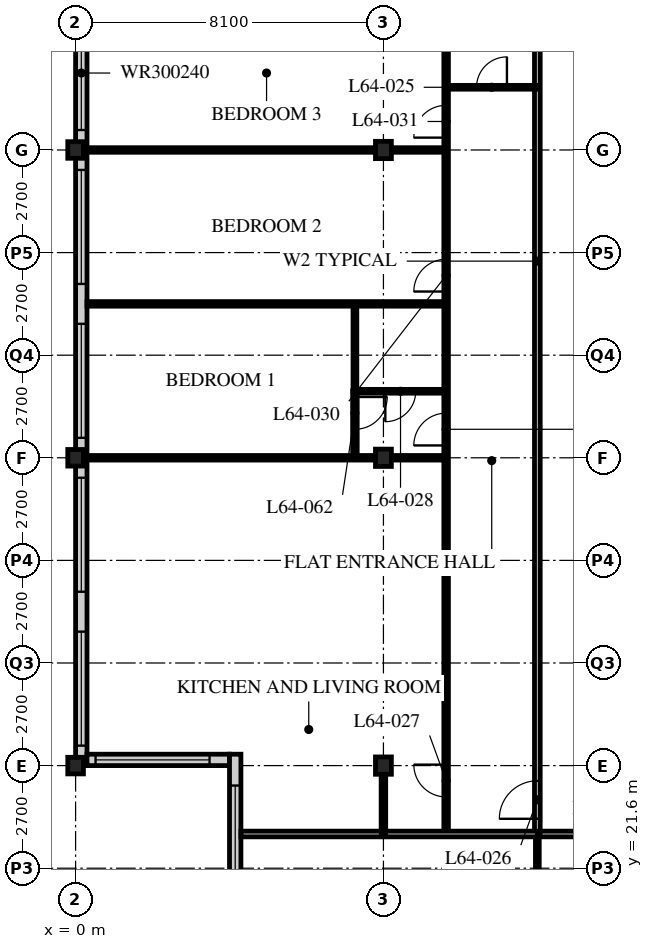
"""IFC4 building model, lengths in metres.
Left out: names, types, materials, properties, quantities, classifications, styles, units other than length and angle.
Written with IfcOpenShell. Run it as: python <this file> out.ifc"""

import sys

from ifc_helpers import new_model, si_unit, direction, frame, frame_2d, origin, origin_2d, place, context, subcontext, project, spatial, rectangle, i_section, extrude, element, fill, save


model = new_model("IFC4")
c1 = context("Model", 3, precision=1e-05, world=origin(), true_north=direction((0.0, 1.0)))
c2 = subcontext(c1, "Body", "Model", "MODEL_VIEW")
j1 = project(units=[si_unit("LENGTHUNIT", "METRE"), si_unit("PLANEANGLEUNIT", "RADIAN")], contexts=[c1])
p1 = place(None, origin())
s1 = spatial("IfcSite", under=j1, at=p1, CompositionType="ELEMENT")
p2 = place(p1, origin())
s2 = spatial("IfcBuilding", under=s1, at=p2, CompositionType="ELEMENT")
p3 = place(p2, frame((0.0, 0.0, 250.2)))
s3 = spatial("IfcBuildingStorey", under=s2, at=p3, CompositionType="ELEMENT", Elevation=250.2)
for number, where, z_axis, x_axis in (
    (1, (0.0, 24.3, 0.0), (0.0, 0.0, 1.0), (1.0, 0.0, 0.0)),
    (2, (0.0, 32.4, 0.0), (0.0, 0.0, 1.0), (1.0, 0.0, 0.0)),
    (3, (0.0, 40.5, 0.0), (0.0, 0.0, 1.0), (1.0, 0.0, 0.0)),
):
    element("IfcColumn", number, at=place(p3, frame(where, z_axis=z_axis, x_axis=x_axis)), inside=s3, PredefinedType="COLUMN", context=c2, shape_type="SweptSolid", body=[
        extrude(i_section(OverallWidth=0.412, OverallDepth=0.437, WebThickness=0.036, FlangeThickness=0.058, FilletRadius=0.015, at=origin_2d()), origin(), (0.0, 0.0, 1.0), 3.9),
    ])
for number, where, z_axis, x_axis in (
    (4, (8.1, 24.3, 0.0), (0.0, 0.0, 1.0), (1.0, 0.0, 0.0)),
    (5, (8.1, 32.4, 0.0), (0.0, 0.0, 1.0), (1.0, 0.0, 0.0)),
    (6, (8.1, 40.5, 0.0), (0.0, 0.0, 1.0), (1.0, 0.0, 0.0)),
):
    element("IfcColumn", number, at=place(p3, frame(where, z_axis=z_axis, x_axis=x_axis)), inside=s3, PredefinedType="COLUMN", context=c2, shape_type="SweptSolid", body=[
        extrude(i_section(OverallWidth=0.418, OverallDepth=0.456, WebThickness=0.042, FlangeThickness=0.067, FilletRadius=0.015, at=origin_2d()), origin(), (0.0, 0.0, 1.0), 3.9),
    ])
p4 = place(p3, frame((0.15, 56.4, 0.0), z_axis=(0.0, 0.0, 1.0), x_axis=(0.0, -1.0, 0.0)))
e7 = element("IfcWall", 7, at=p4, inside=s3, PredefinedType="SOLIDWALL", context=c2, shape_type="SweptSolid", body=[
    extrude(rectangle(XDim=32.1, YDim=0.3, at=frame_2d((16.05, 0.0))), origin(), (0.0, 0.0, 1.0), 3.69),
])
p5 = place(p4, frame((0.225, 0.0, 0.6)))
e8 = element("IfcOpeningElement", 8, at=p5, cuts=e7, PredefinedType="OPENING", context=c2, shape_type="SweptSolid", body=[
    extrude(rectangle(XDim=3.0, YDim=2.4, at=frame_2d((1.5, 1.2))), frame((0.0, 0.16, 0.0), z_axis=(0.0, -1.0, 0.0), x_axis=(1.0, 0.0, 0.0)), (0.0, 0.0, 1.0), 0.32),
])
p6 = place(p4, frame((4.275, 0.0, 0.6)))
e9 = element("IfcOpeningElement", 9, at=p6, cuts=e7, PredefinedType="OPENING", context=c2, shape_type="SweptSolid", body=[
    extrude(rectangle(XDim=3.0, YDim=2.4, at=frame_2d((1.5, 1.2))), frame((0.0, 0.16, 0.0), z_axis=(0.0, -1.0, 0.0), x_axis=(1.0, 0.0, 0.0)), (0.0, 0.0, 1.0), 0.32),
])
p7 = place(p4, frame((8.325, 0.0, 0.6)))
e10 = element("IfcOpeningElement", 10, at=p7, cuts=e7, PredefinedType="OPENING", context=c2, shape_type="SweptSolid", body=[
    extrude(rectangle(XDim=3.0, YDim=2.4, at=frame_2d((1.5, 1.2))), frame((0.0, 0.16, 0.0), z_axis=(0.0, -1.0, 0.0), x_axis=(1.0, 0.0, 0.0)), (0.0, 0.0, 1.0), 0.32),
])
p8 = place(p4, frame((12.375, 0.0, 0.6)))
e11 = element("IfcOpeningElement", 11, at=p8, cuts=e7, PredefinedType="OPENING", context=c2, shape_type="SweptSolid", body=[
    extrude(rectangle(XDim=3.0, YDim=2.4, at=frame_2d((1.5, 1.2))), frame((0.0, 0.16, 0.0), z_axis=(0.0, -1.0, 0.0), x_axis=(1.0, 0.0, 0.0)), (0.0, 0.0, 1.0), 0.32),
])
p9 = place(p4, frame((16.425, 0.0, 0.6)))
e12 = element("IfcOpeningElement", 12, at=p9, cuts=e7, PredefinedType="OPENING", context=c2, shape_type="SweptSolid", body=[
    extrude(rectangle(XDim=3.0, YDim=2.4, at=frame_2d((1.5, 1.2))), frame((0.0, 0.16, 0.0), z_axis=(0.0, -1.0, 0.0), x_axis=(1.0, 0.0, 0.0)), (0.0, 0.0, 1.0), 0.32),
])
p10 = place(p4, frame((20.475, 0.0, 0.6)))
e13 = element("IfcOpeningElement", 13, at=p10, cuts=e7, PredefinedType="OPENING", context=c2, shape_type="SweptSolid", body=[
    extrude(rectangle(XDim=3.0, YDim=2.4, at=frame_2d((1.5, 1.2))), frame((0.0, 0.16, 0.0), z_axis=(0.0, -1.0, 0.0), x_axis=(1.0, 0.0, 0.0)), (0.0, 0.0, 1.0), 0.32),
])
p11 = place(p4, frame((24.525, 0.0, 0.6)))
e14 = element("IfcOpeningElement", 14, at=p11, cuts=e7, PredefinedType="OPENING", context=c2, shape_type="SweptSolid", body=[
    extrude(rectangle(XDim=3.0, YDim=2.4, at=frame_2d((1.5, 1.2))), frame((0.0, 0.16, 0.0), z_axis=(0.0, -1.0, 0.0), x_axis=(1.0, 0.0, 0.0)), (0.0, 0.0, 1.0), 0.32),
])
p12 = place(p4, frame((28.575, 0.0, 0.6)))
e15 = element("IfcOpeningElement", 15, at=p12, cuts=e7, PredefinedType="OPENING", context=c2, shape_type="SweptSolid", body=[
    extrude(rectangle(XDim=3.0, YDim=2.4, at=frame_2d((1.5, 1.2))), frame((0.0, 0.16, 0.0), z_axis=(0.0, -1.0, 0.0), x_axis=(1.0, 0.0, 0.0)), (0.0, 0.0, 1.0), 0.32),
])
p13 = place(p3, frame((0.3, 24.45, 0.0), z_axis=(0.0, 0.0, 1.0), x_axis=(1.0, 0.0, 0.0)))
e16 = element("IfcWall", 16, at=p13, inside=s3, PredefinedType="SOLIDWALL", context=c2, shape_type="SweptSolid", body=[
    extrude(rectangle(XDim=3.75, YDim=0.3, at=frame_2d((1.875, 0.0))), origin(), (0.0, 0.0, 1.0), 3.69),
])
p14 = place(p13, frame((0.225, 0.0, 0.6)))
e17 = element("IfcOpeningElement", 17, at=p14, cuts=e16, PredefinedType="OPENING", context=c2, shape_type="SweptSolid", body=[
    extrude(rectangle(XDim=3.0, YDim=2.3, at=frame_2d((1.5, 1.15))), frame((0.0, 0.16, 0.0), z_axis=(0.0, -1.0, 0.0), x_axis=(1.0, 0.0, 0.0)), (0.0, 0.0, 1.0), 0.32),
])
p15 = place(p3, frame((4.2, 24.6, 0.0), z_axis=(0.0, 0.0, 1.0), x_axis=(0.0, -1.0, 0.0)))
e18 = element("IfcWall", 18, at=p15, inside=s3, PredefinedType="SOLIDWALL", context=c2, shape_type="SweptSolid", body=[
    extrude(rectangle(XDim=4.35, YDim=0.3, at=frame_2d((2.175, 0.0))), origin(), (0.0, 0.0, 1.0), 3.69),
])
p16 = place(p15, frame((0.825, 0.0, 0.6)))
e19 = element("IfcOpeningElement", 19, at=p16, cuts=e18, PredefinedType="OPENING", context=c2, shape_type="SweptSolid", body=[
    extrude(rectangle(XDim=3.0, YDim=2.3, at=frame_2d((1.5, 1.15))), frame((0.0, 0.16, 0.0), z_axis=(0.0, -1.0, 0.0), x_axis=(1.0, 0.0, 0.0)), (0.0, 0.0, 1.0), 0.32),
])
p17 = place(p3, frame((12.15, 22.5, 0.0), z_axis=(0.0, 0.0, 1.0), x_axis=(1.0, 0.0, 0.0)))
e20 = element("IfcWall", 20, at=p17, inside=s3, PredefinedType="PARTITIONING", context=c2, shape_type="SweptSolid", body=[
    extrude(rectangle(XDim=24.3, YDim=0.15, at=frame_2d((12.15, 0.0))), origin(), (0.0, 0.0, 1.0), 3.69),
])
p18 = place(p17, frame((6.4, 0.0, 0.0)))
e21 = element("IfcOpeningElement", 21, at=p18, cuts=e20, PredefinedType="OPENING", context=c2, shape_type="SweptSolid", body=[
    extrude(rectangle(XDim=1.0, YDim=2.1, at=frame_2d((0.5, 1.05))), frame((0.0, 0.085, 0.0), z_axis=(0.0, -1.0, 0.0), x_axis=(1.0, 0.0, 0.0)), (0.0, 0.0, 1.0), 0.17),
])
p19 = place(p17, frame((8.5, 0.0, 0.0)))
e22 = element("IfcOpeningElement", 22, at=p19, cuts=e20, PredefinedType="OPENING", context=c2, shape_type="SweptSolid", body=[
    extrude(rectangle(XDim=1.0, YDim=2.1, at=frame_2d((0.5, 1.05))), frame((0.0, 0.085, 0.0), z_axis=(0.0, -1.0, 0.0), x_axis=(1.0, 0.0, 0.0)), (0.0, 0.0, 1.0), 0.17),
])
p20 = place(p17, frame((16.6, 0.0, 0.0)))
e23 = element("IfcOpeningElement", 23, at=p20, cuts=e20, PredefinedType="OPENING", context=c2, shape_type="SweptSolid", body=[
    extrude(rectangle(XDim=1.0, YDim=2.1, at=frame_2d((0.5, 1.05))), frame((0.0, 0.085, 0.0), z_axis=(0.0, -1.0, 0.0), x_axis=(1.0, 0.0, 0.0)), (0.0, 0.0, 1.0), 0.17),
])
p21 = place(p17, frame((2.625, 0.0, 0.0)))
e24 = element("IfcOpeningElement", 24, at=p21, cuts=e20, PredefinedType="OPENING", context=c2, shape_type="SweptSolid", body=[
    extrude(rectangle(XDim=1.0, YDim=2.1, at=frame_2d((0.5, 1.05))), frame((0.0, 0.085, 0.0), z_axis=(0.0, -1.0, 0.0), x_axis=(1.0, 0.0, 0.0)), (0.0, 0.0, 1.0), 0.17),
])
p22 = place(p3, frame((12.15, 22.5, 0.0), z_axis=(0.0, 0.0, 1.0), x_axis=(0.0, 1.0, 0.0)))
e25 = element("IfcWall", 25, at=p22, inside=s3, PredefinedType="PARTITIONING", context=c2, shape_type="SweptSolid", body=[
    extrude(rectangle(XDim=30.15, YDim=0.15, at=frame_2d((15.075, 0.0))), origin(), (0.0, 0.0, 1.0), 3.69),
])
p23 = place(p22, frame((0.4, 0.0, 0.0)))
e26 = element("IfcOpeningElement", 26, at=p23, cuts=e25, PredefinedType="OPENING", context=c2, shape_type="SweptSolid", body=[
    extrude(rectangle(XDim=1.0, YDim=2.1, at=frame_2d((0.5, 1.05))), frame((0.0, 0.085, 0.0), z_axis=(0.0, -1.0, 0.0), x_axis=(1.0, 0.0, 0.0)), (0.0, 0.0, 1.0), 0.17),
])
p24 = place(p22, frame((24.4, 0.0, 0.0)))
e27 = element("IfcOpeningElement", 27, at=p24, cuts=e25, PredefinedType="OPENING", context=c2, shape_type="SweptSolid", body=[
    extrude(rectangle(XDim=1.0, YDim=2.1, at=frame_2d((0.5, 1.05))), frame((0.0, 0.085, 0.0), z_axis=(0.0, -1.0, 0.0), x_axis=(1.0, 0.0, 0.0)), (0.0, 0.0, 1.0), 0.17),
])
p25 = place(p22, frame((28.45, 0.0, 0.0)))
e28 = element("IfcOpeningElement", 28, at=p25, cuts=e25, PredefinedType="OPENING", context=c2, shape_type="SweptSolid", body=[
    extrude(rectangle(XDim=1.0, YDim=2.1, at=frame_2d((0.5, 1.05))), frame((0.0, 0.085, 0.0), z_axis=(0.0, -1.0, 0.0), x_axis=(1.0, 0.0, 0.0)), (0.0, 0.0, 1.0), 0.17),
])
p26 = place(p3, frame((9.75, 22.5, 0.0), z_axis=(0.0, 0.0, 1.0), x_axis=(0.0, 1.0, 0.0)))
e29 = element("IfcWall", 29, at=p26, inside=s3, PredefinedType="PARTITIONING", context=c2, shape_type="SweptSolid", body=[
    extrude(rectangle(XDim=22.05, YDim=0.12, at=frame_2d((11.025, 0.0))), origin(), (0.0, 0.0, 1.0), 3.69),
])
p27 = place(p26, frame((0.975, 0.0, 0.0)))
e30 = element("IfcOpeningElement", 30, at=p27, cuts=e29, PredefinedType="OPENING", context=c2, shape_type="SweptSolid", body=[
    extrude(rectangle(XDim=0.85, YDim=2.1, at=frame_2d((0.425, 1.05))), frame((0.0, 0.07, 0.0), z_axis=(0.0, -1.0, 0.0), x_axis=(1.0, 0.0, 0.0)), (0.0, 0.0, 1.0), 0.14),
])
p28 = place(p26, frame((10.225, 0.0, 0.0)))
e31 = element("IfcOpeningElement", 31, at=p28, cuts=e29, PredefinedType="OPENING", context=c2, shape_type="SweptSolid", body=[
    extrude(rectangle(XDim=0.85, YDim=2.1, at=frame_2d((0.425, 1.05))), frame((0.0, 0.07, 0.0), z_axis=(0.0, -1.0, 0.0), x_axis=(1.0, 0.0, 0.0)), (0.0, 0.0, 1.0), 0.14),
])
p29 = place(p26, frame((14.275, 0.0, 0.0)))
e32 = element("IfcOpeningElement", 32, at=p29, cuts=e29, PredefinedType="OPENING", context=c2, shape_type="SweptSolid", body=[
    extrude(rectangle(XDim=0.85, YDim=2.1, at=frame_2d((0.425, 1.05))), frame((0.0, 0.07, 0.0), z_axis=(0.0, -1.0, 0.0), x_axis=(1.0, 0.0, 0.0)), (0.0, 0.0, 1.0), 0.14),
])
p30 = place(p26, frame((18.325, 0.0, 0.0)))
e33 = element("IfcOpeningElement", 33, at=p30, cuts=e29, PredefinedType="OPENING", context=c2, shape_type="SweptSolid", body=[
    extrude(rectangle(XDim=0.85, YDim=2.1, at=frame_2d((0.425, 1.05))), frame((0.0, 0.07, 0.0), z_axis=(0.0, -1.0, 0.0), x_axis=(1.0, 0.0, 0.0)), (0.0, 0.0, 1.0), 0.14),
])
p31 = place(p3, frame((12.15, 42.15, 0.0), z_axis=(0.0, 0.0, 1.0), x_axis=(-1.0, 0.0, 0.0)))
e34 = element("IfcWall", 34, at=p31, inside=s3, PredefinedType="PARTITIONING", context=c2, shape_type="SweptSolid", body=[
    extrude(rectangle(XDim=2.4, YDim=0.1, at=frame_2d((1.2, 0.0))), origin(), (0.0, 0.0, 1.0), 3.69),
])
p32 = place(p31, frame((0.8, 0.0, 0.0)))
e35 = element("IfcOpeningElement", 35, at=p32, cuts=e34, PredefinedType="OPENING", context=c2, shape_type="SweptSolid", body=[
    extrude(rectangle(XDim=0.8, YDim=2.1, at=frame_2d((0.4, 1.05))), frame((0.0, 0.06, 0.0), z_axis=(0.0, -1.0, 0.0), x_axis=(1.0, 0.0, 0.0)), (0.0, 0.0, 1.0), 0.12),
])
p33 = place(p3, frame((9.75, 34.15, 0.0), z_axis=(0.0, 0.0, 1.0), x_axis=(-1.0, 0.0, 0.0)))
e36 = element("IfcWall", 36, at=p33, inside=s3, PredefinedType="PARTITIONING", context=c2, shape_type="SweptSolid", body=[
    extrude(rectangle(XDim=2.4, YDim=0.1, at=frame_2d((1.2, 0.0))), origin(), (0.0, 0.0, 1.0), 3.69),
])
p34 = place(p33, frame((0.8, 0.0, 0.0)))
e37 = element("IfcOpeningElement", 37, at=p34, cuts=e36, PredefinedType="OPENING", context=c2, shape_type="SweptSolid", body=[
    extrude(rectangle(XDim=0.8, YDim=2.1, at=frame_2d((0.4, 1.05))), frame((0.0, 0.06, 0.0), z_axis=(0.0, -1.0, 0.0), x_axis=(1.0, 0.0, 0.0)), (0.0, 0.0, 1.0), 0.12),
])
p35 = place(p3, frame((7.35, 34.15, 0.0), z_axis=(0.0, 0.0, 1.0), x_axis=(0.0, 1.0, 0.0)))
e38 = element("IfcWall", 38, at=p35, inside=s3, PredefinedType="PARTITIONING", context=c2, shape_type="SweptSolid", body=[
    extrude(rectangle(XDim=2.3, YDim=0.1, at=frame_2d((1.15, 0.0))), origin(), (0.0, 0.0, 1.0), 3.69),
])
p36 = place(p3, frame((9.75, 32.4, 0.0), z_axis=(0.0, 0.0, 1.0), x_axis=(-1.0, 0.0, 0.0)))
e39 = element("IfcWall", 39, at=p36, inside=s3, PredefinedType="PARTITIONING", context=c2, shape_type="SweptSolid", body=[
    extrude(rectangle(XDim=9.45, YDim=0.12, at=frame_2d((4.725, 0.0))), origin(), (0.0, 0.0, 1.0), 3.078),
])
p37 = place(p3, frame((9.75, 36.45, 0.0), z_axis=(0.0, 0.0, 1.0), x_axis=(-1.0, 0.0, 0.0)))
e40 = element("IfcWall", 40, at=p37, inside=s3, PredefinedType="PARTITIONING", context=c2, shape_type="SweptSolid", body=[
    extrude(rectangle(XDim=9.45, YDim=0.12, at=frame_2d((4.725, 0.0))), origin(), (0.0, 0.0, 1.0), 3.69),
])
p38 = place(p3, frame((9.75, 40.5, 0.0), z_axis=(0.0, 0.0, 1.0), x_axis=(-1.0, 0.0, 0.0)))
e41 = element("IfcWall", 41, at=p38, inside=s3, PredefinedType="PARTITIONING", context=c2, shape_type="SweptSolid", body=[
    extrude(rectangle(XDim=9.45, YDim=0.12, at=frame_2d((4.725, 0.0))), origin(), (0.0, 0.0, 1.0), 3.078),
])
p39 = place(p3, frame((12.15, 22.5, 0.0), z_axis=(0.0, 0.0, 1.0), x_axis=(0.0, -1.0, 0.0)))
e42 = element("IfcWall", 42, at=p39, inside=s3, PredefinedType="PARTITIONING", context=c2, shape_type="SweptSolid", body=[
    extrude(rectangle(XDim=2.4, YDim=0.1, at=frame_2d((1.2, 0.0))), origin(), (0.0, 0.0, 1.0), 3.69),
])
p40 = place(p3, frame((4.35, 22.5, 0.0), z_axis=(0.0, 0.0, 1.0), x_axis=(1.0, 0.0, 0.0)))
e43 = element("IfcWall", 43, at=p40, inside=s3, PredefinedType="PARTITIONING", context=c2, shape_type="SweptSolid", body=[
    extrude(rectangle(XDim=7.8, YDim=0.15, at=frame_2d((3.9, 0.0))), origin(), (0.0, 0.0, 1.0), 3.69),
])
p41 = place(p3, frame((7.35, 32.4, 0.0), z_axis=(0.0, 0.0, 1.0), x_axis=(0.0, 1.0, 0.0)))
e44 = element("IfcWall", 44, at=p41, inside=s3, PredefinedType="PARTITIONING", context=c2, shape_type="SweptSolid", body=[
    extrude(rectangle(XDim=1.76, YDim=0.12, at=frame_2d((0.88, 0.0))), origin(), (0.0, 0.0, 1.0), 3.69),
])
p42 = place(p41, frame((0.75, 0.0, 0.0)))
e45 = element("IfcOpeningElement", 45, at=p42, cuts=e44, PredefinedType="OPENING", context=c2, shape_type="SweptSolid", body=[
    extrude(rectangle(XDim=0.85, YDim=2.1, at=frame_2d((0.425, 1.05))), frame((0.0, 0.07, 0.0), z_axis=(0.0, -1.0, 0.0), x_axis=(1.0, 0.0, 0.0)), (0.0, 0.0, 1.0), 0.14),
])
p43 = place(p3, frame((8.1, 22.5, 0.0), z_axis=(0.0, 0.0, 1.0), x_axis=(0.0, 1.0, 0.0)))
e46 = element("IfcWall", 46, at=p43, inside=s3, PredefinedType="PARTITIONING", context=c2, shape_type="SweptSolid", body=[
    extrude(rectangle(XDim=1.597, YDim=0.12, at=frame_2d((0.798, 0.0))), origin(), (0.0, 0.0, 1.0), 3.078),
])
p44 = place(p8, origin())
e47 = element("IfcWindow", 47, at=p44, inside=s3, PartitioningType="SINGLE_PANEL", PredefinedType="WINDOW", context=c2, shape_type="SweptSolid", body=[
    extrude(rectangle(XDim=3.0, YDim=2.4, at=frame_2d((1.5, 1.2))), frame((0.0, 0.03, 0.0), z_axis=(0.0, -1.0, 0.0), x_axis=(1.0, 0.0, 0.0)), (0.0, 0.0, 1.0), 0.06),
])
fill(e11, e47)
p45 = place(p9, origin())
e48 = element("IfcWindow", 48, at=p45, inside=s3, PartitioningType="SINGLE_PANEL", PredefinedType="WINDOW", context=c2, shape_type="SweptSolid", body=[
    extrude(rectangle(XDim=3.0, YDim=2.4, at=frame_2d((1.5, 1.2))), frame((0.0, 0.03, 0.0), z_axis=(0.0, -1.0, 0.0), x_axis=(1.0, 0.0, 0.0)), (0.0, 0.0, 1.0), 0.06),
])
fill(e12, e48)
p46 = place(p10, origin())
e49 = element("IfcWindow", 49, at=p46, inside=s3, PartitioningType="SINGLE_PANEL", PredefinedType="WINDOW", context=c2, shape_type="SweptSolid", body=[
    extrude(rectangle(XDim=3.0, YDim=2.4, at=frame_2d((1.5, 1.2))), frame((0.0, 0.03, 0.0), z_axis=(0.0, -1.0, 0.0), x_axis=(1.0, 0.0, 0.0)), (0.0, 0.0, 1.0), 0.06),
])
fill(e13, e49)
p47 = place(p11, origin())
e50 = element("IfcWindow", 50, at=p47, inside=s3, PartitioningType="SINGLE_PANEL", PredefinedType="WINDOW", context=c2, shape_type="SweptSolid", body=[
    extrude(rectangle(XDim=3.0, YDim=2.4, at=frame_2d((1.5, 1.2))), frame((0.0, 0.03, 0.0), z_axis=(0.0, -1.0, 0.0), x_axis=(1.0, 0.0, 0.0)), (0.0, 0.0, 1.0), 0.06),
])
fill(e14, e50)
p48 = place(p12, origin())
e51 = element("IfcWindow", 51, at=p48, inside=s3, PartitioningType="SINGLE_PANEL", PredefinedType="WINDOW", context=c2, shape_type="SweptSolid", body=[
    extrude(rectangle(XDim=3.0, YDim=2.4, at=frame_2d((1.5, 1.2))), frame((0.0, 0.03, 0.0), z_axis=(0.0, -1.0, 0.0), x_axis=(1.0, 0.0, 0.0)), (0.0, 0.0, 1.0), 0.06),
])
fill(e15, e51)
p49 = place(p14, origin())
e52 = element("IfcWindow", 52, at=p49, inside=s3, PartitioningType="SINGLE_PANEL", PredefinedType="WINDOW", context=c2, shape_type="SweptSolid", body=[
    extrude(rectangle(XDim=3.0, YDim=2.3, at=frame_2d((1.5, 1.15))), frame((0.0, 0.03, 0.0), z_axis=(0.0, -1.0, 0.0), x_axis=(1.0, 0.0, 0.0)), (0.0, 0.0, 1.0), 0.06),
])
fill(e17, e52)
p50 = place(p16, origin())
e53 = element("IfcWindow", 53, at=p50, inside=s3, PartitioningType="SINGLE_PANEL", PredefinedType="WINDOW", context=c2, shape_type="SweptSolid", body=[
    extrude(rectangle(XDim=3.0, YDim=2.3, at=frame_2d((1.5, 1.15))), frame((0.0, 0.03, 0.0), z_axis=(0.0, -1.0, 0.0), x_axis=(1.0, 0.0, 0.0)), (0.0, 0.0, 1.0), 0.06),
])
fill(e19, e53)
p51 = place(p32, origin())
e54 = element("IfcDoor", 54, at=p51, inside=s3, OperationType="SINGLE_SWING_RIGHT", PredefinedType="DOOR", context=c2, shape_type="SweptSolid", body=[
    extrude(rectangle(XDim=0.8, YDim=2.1, at=frame_2d((0.4, 1.05))), frame((0.0, 0.025, 0.0), z_axis=(0.0, -1.0, 0.0), x_axis=(1.0, 0.0, 0.0)), (0.0, 0.0, 1.0), 0.05),
])
fill(e35, e54)
p52 = place(p23, origin())
e55 = element("IfcDoor", 55, at=p52, inside=s3, OperationType="SINGLE_SWING_LEFT", PredefinedType="DOOR", context=c2, shape_type="SweptSolid", body=[
    extrude(rectangle(XDim=1.0, YDim=2.1, at=frame_2d((0.5, 1.05))), frame((0.0, 0.025, 0.0), z_axis=(0.0, -1.0, 0.0), x_axis=(1.0, 0.0, 0.0)), (0.0, 0.0, 1.0), 0.05),
])
fill(e26, e55)
p53 = place(p27, origin())
e56 = element("IfcDoor", 56, at=p53, inside=s3, OperationType="SINGLE_SWING_RIGHT", PredefinedType="DOOR", context=c2, shape_type="SweptSolid", body=[
    extrude(rectangle(XDim=0.85, YDim=2.1, at=frame_2d((0.425, 1.05))), frame((0.0, 0.025, 0.0), z_axis=(0.0, -1.0, 0.0), x_axis=(1.0, 0.0, 0.0)), (0.0, 0.0, 1.0), 0.05),
])
fill(e30, e56)
p54 = place(p34, origin())
e57 = element("IfcDoor", 57, at=p54, inside=s3, OperationType="SINGLE_SWING_RIGHT", PredefinedType="DOOR", context=c2, shape_type="SweptSolid", body=[
    extrude(rectangle(XDim=0.8, YDim=2.1, at=frame_2d((0.4, 1.05))), frame((0.0, 0.025, 0.0), z_axis=(0.0, -1.0, 0.0), x_axis=(1.0, 0.0, 0.0)), (0.0, 0.0, 1.0), 0.05),
])
fill(e37, e57)
p55 = place(p28, origin())
e58 = element("IfcDoor", 58, at=p55, inside=s3, OperationType="SINGLE_SWING_LEFT", PredefinedType="DOOR", context=c2, shape_type="SweptSolid", body=[
    extrude(rectangle(XDim=0.85, YDim=2.1, at=frame_2d((0.425, 1.05))), frame((0.0, 0.025, 0.0), z_axis=(0.0, -1.0, 0.0), x_axis=(1.0, 0.0, 0.0)), (0.0, 0.0, 1.0), 0.05),
])
fill(e31, e58)
p56 = place(p29, origin())
e59 = element("IfcDoor", 59, at=p56, inside=s3, OperationType="SINGLE_SWING_LEFT", PredefinedType="DOOR", context=c2, shape_type="SweptSolid", body=[
    extrude(rectangle(XDim=0.85, YDim=2.1, at=frame_2d((0.425, 1.05))), frame((0.0, 0.025, 0.0), z_axis=(0.0, -1.0, 0.0), x_axis=(1.0, 0.0, 0.0)), (0.0, 0.0, 1.0), 0.05),
])
fill(e32, e59)
p57 = place(p30, origin())
e60 = element("IfcDoor", 60, at=p57, inside=s3, OperationType="SINGLE_SWING_LEFT", PredefinedType="DOOR", context=c2, shape_type="SweptSolid", body=[
    extrude(rectangle(XDim=0.85, YDim=2.1, at=frame_2d((0.425, 1.05))), frame((0.0, 0.025, 0.0), z_axis=(0.0, -1.0, 0.0), x_axis=(1.0, 0.0, 0.0)), (0.0, 0.0, 1.0), 0.05),
])
fill(e33, e60)
p58 = place(p42, origin())
e61 = element("IfcDoor", 61, at=p58, inside=s3, OperationType="SINGLE_SWING_LEFT", PredefinedType="DOOR", context=c2, shape_type="SweptSolid", body=[
    extrude(rectangle(XDim=0.85, YDim=2.1, at=frame_2d((0.425, 1.05))), frame((0.0, 0.025, 0.0), z_axis=(0.0, -1.0, 0.0), x_axis=(1.0, 0.0, 0.0)), (0.0, 0.0, 1.0), 0.05),
])
fill(e45, e61)
save(model, sys.argv[1])
